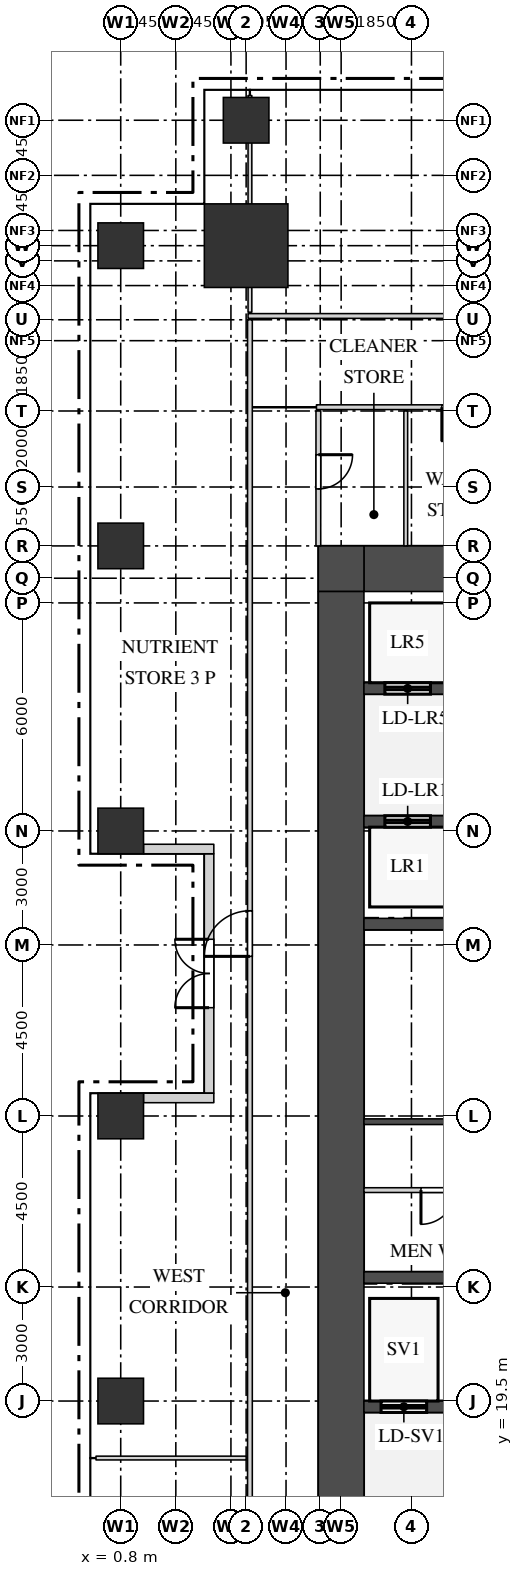
"""IFC4 building model, lengths in metres.
Left out: names, types, materials, properties, quantities, classifications, styles, units other than length and angle.
Written with IfcOpenShell. Run it as: python <this file> out.ifc"""

import sys

from ifc_helpers import new_model, si_unit, direction, frame, frame_2d, origin, origin_2d, place, context, subcontext, project, spatial, rectangle, extrude, source, transform, mapped, element, fill, save


model = new_model("IFC4")
c1 = context("Model", 3, precision=1e-05, world=origin(), true_north=direction((0.0, 1.0)))
c2 = subcontext(c1, "Body", "Model", "MODEL_VIEW")
j1 = project(units=[si_unit("LENGTHUNIT", "METRE"), si_unit("PLANEANGLEUNIT", "RADIAN")], contexts=[c1])
p1 = place(None, origin())
s1 = spatial("IfcSite", under=j1, at=p1, CompositionType="ELEMENT")
p2 = place(p1, origin())
s2 = spatial("IfcBuilding", under=s1, at=p2, CompositionType="ELEMENT")
p3 = place(p2, frame((0.0, 0.0, 60.0)))
s3 = spatial("IfcBuildingStorey", under=s2, at=p3, CompositionType="ELEMENT", Elevation=60.0)
m1 = source(origin(), c2, "Body", "SweptSolid", [
    extrude(rectangle(XDim=6.7, YDim=1.2, at=frame_2d((3.35, 0.0))), origin(), (0.0, 0.0, 1.0), 4.2),
])
p4 = place(p3, frame((7.2, 41.4, 0.0), z_axis=(0.0, 0.0, 1.0), x_axis=(1.0, 0.0, 0.0)))
e1 = element("IfcWall", 1, at=p4, inside=s3, PredefinedType="SHEAR", context=c2, shape_type="MappedRepresentation", body=[
    mapped(m1, transform((0.0, 0.0, 0.0))),
])
m2 = source(origin(), c2, "Body", "SweptSolid", [
    extrude(rectangle(XDim=1.2, YDim=1.2, at=frame_2d((0.6, 0.0))), origin(), (0.0, 0.0, 1.0), 4.2),
])
p5 = place(p3, frame((6.0, 41.4, 0.0), z_axis=(0.0, 0.0, 1.0), x_axis=(1.0, 0.0, 0.0)))
e2 = element("IfcWall", 2, at=p5, inside=s3, PredefinedType="SHEAR", context=c2, shape_type="MappedRepresentation", body=[
    mapped(m2, transform((0.0, 0.0, 0.0))),
])
m3 = source(origin(), c2, "Body", "SweptSolid", [
    extrude(rectangle(XDim=27.6, YDim=1.2, at=frame_2d((13.8, 0.0))), origin(), (0.0, 0.0, 1.0), 4.2),
])
p6 = place(p3, frame((6.6, 13.2, 0.0), z_axis=(0.0, 0.0, 1.0), x_axis=(0.0, 1.0, 0.0)))
e3 = element("IfcWall", 3, at=p6, inside=s3, PredefinedType="SHEAR", context=c2, shape_type="MappedRepresentation", body=[
    mapped(m3, transform((0.0, 0.0, 0.0))),
])
m4 = source(origin(), c2, "Body", "SweptSolid", [
    extrude(rectangle(XDim=13.0, YDim=0.3, at=frame_2d((6.5, 0.0))), origin(), (0.0, 0.0, 1.0), 4.2),
])
p7 = place(p3, frame((7.2, 22.75, 0.0), z_axis=(0.0, 0.0, 1.0), x_axis=(1.0, 0.0, 0.0)))
e4 = element("IfcWall", 4, at=p7, inside=s3, PredefinedType="STANDARD", context=c2, shape_type="MappedRepresentation", body=[
    mapped(m4, transform((0.0, 0.0, 0.0))),
])
m5 = source(origin(), c2, "Body", "SweptSolid", [
    extrude(rectangle(XDim=8.875, YDim=0.3, at=frame_2d((4.438, 0.0))), origin(), (0.0, 0.0, 1.0), 4.2),
])
p8 = place(p3, frame((7.2, 19.35, 0.0), z_axis=(0.0, 0.0, 1.0), x_axis=(1.0, 0.0, 0.0)))
e5 = element("IfcWall", 5, at=p8, inside=s3, PredefinedType="STANDARD", context=c2, shape_type="MappedRepresentation", body=[
    mapped(m5, transform((0.0, 0.0, 0.0))),
])
m6 = source(origin(), c2, "Body", "SweptSolid", [
    extrude(rectangle(XDim=1.2, YDim=2.1, at=frame_2d((0.6, 1.05))), frame((0.0, 0.16, 0.0), z_axis=(0.0, -1.0, 0.0), x_axis=(1.0, 0.0, 0.0)), (0.0, 0.0, 1.0), 0.32),
])
p9 = place(p8, frame((0.45, 0.0, 0.0)))
e6 = element("IfcOpeningElement", 6, at=p9, cuts=e5, PredefinedType="OPENING", context=c2, shape_type="MappedRepresentation", body=[
    mapped(m6, transform((0.0, 0.0, 0.0))),
])
p10 = place(p8, frame((2.8, 0.0, 0.0)))
e7 = element("IfcOpeningElement", 7, at=p10, cuts=e5, PredefinedType="OPENING", context=c2, shape_type="MappedRepresentation", body=[
    mapped(m6, transform((0.0, 0.0, 0.0))),
])
p11 = place(p8, frame((5.05, 0.0, 0.0)))
e8 = element("IfcOpeningElement", 8, at=p11, cuts=e5, PredefinedType="OPENING", context=c2, shape_type="MappedRepresentation", body=[
    mapped(m6, transform((0.0, 0.0, 0.0))),
])
p12 = place(p8, frame((7.2, 0.0, 0.0)))
e9 = element("IfcOpeningElement", 9, at=p12, cuts=e5, PredefinedType="OPENING", context=c2, shape_type="MappedRepresentation", body=[
    mapped(m6, transform((0.0, 0.0, 0.0))),
])
m7 = source(origin(), c2, "Body", "SweptSolid", [
    extrude(rectangle(XDim=15.6, YDim=0.3, at=frame_2d((7.8, 0.0))), origin(), (0.0, 0.0, 1.0), 4.2),
])
p13 = place(p3, frame((7.2, 32.05, 0.0), z_axis=(0.0, 0.0, 1.0), x_axis=(1.0, 0.0, 0.0)))
e10 = element("IfcWall", 10, at=p13, inside=s3, PredefinedType="STANDARD", context=c2, shape_type="MappedRepresentation", body=[
    mapped(m7, transform((0.0, 0.0, 0.0))),
])
p14 = place(p3, frame((7.2, 38.25, 0.0), z_axis=(0.0, 0.0, 1.0), x_axis=(1.0, 0.0, 0.0)))
e11 = element("IfcWall", 11, at=p14, inside=s3, PredefinedType="STANDARD", context=c2, shape_type="MappedRepresentation", body=[
    mapped(m7, transform((0.0, 0.0, 0.0))),
])
p15 = place(p14, frame((0.55, 0.0, 0.0)))
e12 = element("IfcOpeningElement", 12, at=p15, cuts=e11, PredefinedType="OPENING", context=c2, shape_type="MappedRepresentation", body=[
    mapped(m6, transform((0.0, 0.0, 0.0))),
])
p16 = place(p14, frame((3.1, 0.0, 0.0)))
e13 = element("IfcOpeningElement", 13, at=p16, cuts=e11, PredefinedType="OPENING", context=c2, shape_type="MappedRepresentation", body=[
    mapped(m6, transform((0.0, 0.0, 0.0))),
])
p17 = place(p14, frame((5.65, 0.0, 0.0)))
e14 = element("IfcOpeningElement", 14, at=p17, cuts=e11, PredefinedType="OPENING", context=c2, shape_type="MappedRepresentation", body=[
    mapped(m6, transform((0.0, 0.0, 0.0))),
])
p18 = place(p14, frame((8.2, 0.0, 0.0)))
e15 = element("IfcOpeningElement", 15, at=p18, cuts=e11, PredefinedType="OPENING", context=c2, shape_type="MappedRepresentation", body=[
    mapped(m6, transform((0.0, 0.0, 0.0))),
])
p19 = place(p3, frame((7.2, 34.75, 0.0), z_axis=(0.0, 0.0, 1.0), x_axis=(1.0, 0.0, 0.0)))
e16 = element("IfcWall", 16, at=p19, inside=s3, PredefinedType="STANDARD", context=c2, shape_type="MappedRepresentation", body=[
    mapped(m7, transform((0.0, 0.0, 0.0))),
])
p20 = place(p19, frame((0.55, 0.0, 0.0)))
e17 = element("IfcOpeningElement", 17, at=p20, cuts=e16, PredefinedType="OPENING", context=c2, shape_type="MappedRepresentation", body=[
    mapped(m6, transform((0.0, 0.0, 0.0))),
])
p21 = place(p19, frame((3.1, 0.0, 0.0)))
e18 = element("IfcOpeningElement", 18, at=p21, cuts=e16, PredefinedType="OPENING", context=c2, shape_type="MappedRepresentation", body=[
    mapped(m6, transform((0.0, 0.0, 0.0))),
])
p22 = place(p19, frame((5.65, 0.0, 0.0)))
e19 = element("IfcOpeningElement", 19, at=p22, cuts=e16, PredefinedType="OPENING", context=c2, shape_type="MappedRepresentation", body=[
    mapped(m6, transform((0.0, 0.0, 0.0))),
])
p23 = place(p19, frame((8.2, 0.0, 0.0)))
e20 = element("IfcOpeningElement", 20, at=p23, cuts=e16, PredefinedType="OPENING", context=c2, shape_type="MappedRepresentation", body=[
    mapped(m6, transform((0.0, 0.0, 0.0))),
])
m8 = source(origin(), c2, "Body", "SweptSolid", [
    extrude(rectangle(XDim=2.2, YDim=2.2, at=origin_2d()), origin(), (0.0, 0.0, 1.0), 4.5),
])
p24 = place(p3, frame((4.1, 49.9, 0.0), z_axis=(0.0, 0.0, 1.0), x_axis=(1.0, 0.0, 0.0)))
e21 = element("IfcColumn", 21, at=p24, inside=s3, PredefinedType="COLUMN", context=c2, shape_type="MappedRepresentation", body=[
    mapped(m8, transform((0.0, 0.0, 0.0))),
])
m9 = source(origin(), c2, "Body", "SweptSolid", [
    extrude(rectangle(XDim=1.2, YDim=1.2, at=origin_2d()), origin(), (0.0, 0.0, 1.0), 4.2),
])
for number, where, z_axis, x_axis in (
    (22, (4.1, 53.2, 0.0), (0.0, 0.0, 1.0), (1.0, 0.0, 0.0)),
    (23, (0.8, 19.5, 0.0), (0.0, 0.0, 1.0), (1.0, 0.0, 0.0)),
    (24, (0.8, 27.0, 0.0), (0.0, 0.0, 1.0), (1.0, 0.0, 0.0)),
    (25, (0.8, 34.5, 0.0), (0.0, 0.0, 1.0), (1.0, 0.0, 0.0)),
    (26, (0.8, 42.0, 0.0), (0.0, 0.0, 1.0), (1.0, 0.0, 0.0)),
    (27, (0.8, 49.9, 0.0), (0.0, 0.0, 1.0), (1.0, 0.0, 0.0)),
):
    element("IfcColumn", number, at=place(p3, frame(where, z_axis=z_axis, x_axis=x_axis)), inside=s3, PredefinedType="COLUMN", context=c2, shape_type="MappedRepresentation", body=[
        mapped(m9, transform((0.0, 0.0, 0.0))),
    ])
m10 = source(origin(), c2, "Body", "SweptSolid", [
    extrude(rectangle(XDim=6.3, YDim=0.25, at=frame_2d((3.15, 0.0))), origin(), (0.0, 0.0, 1.0), 4.2),
])
p25 = place(p3, frame((3.125, 27.6, 0.0), z_axis=(0.0, 0.0, 1.0), x_axis=(0.0, 1.0, 0.0)))
e28 = element("IfcWall", 28, at=p25, inside=s3, PredefinedType="SOLIDWALL", context=c2, shape_type="MappedRepresentation", body=[
    mapped(m10, transform((0.0, 0.0, 0.0))),
])
m11 = source(origin(), c2, "Body", "SweptSolid", [
    extrude(rectangle(XDim=1.6, YDim=2.4, at=frame_2d((0.8, 1.2))), frame((0.0, 0.135, 0.0), z_axis=(0.0, -1.0, 0.0), x_axis=(1.0, 0.0, 0.0)), (0.0, 0.0, 1.0), 0.27),
])
p26 = place(p25, frame((0.35, 0.0, 0.0)))
e29 = element("IfcOpeningElement", 29, at=p26, cuts=e28, PredefinedType="OPENING", context=c2, shape_type="MappedRepresentation", body=[
    mapped(m11, transform((0.0, 0.0, 0.0))),
])
p27 = place(p25, frame((4.35, 0.0, 0.0)))
e30 = element("IfcOpeningElement", 30, at=p27, cuts=e28, PredefinedType="OPENING", context=c2, shape_type="MappedRepresentation", body=[
    mapped(m11, transform((0.0, 0.0, 0.0))),
])
m12 = source(origin(), c2, "Body", "SweptSolid", [
    extrude(rectangle(XDim=1.8, YDim=2.4, at=frame_2d((0.9, 1.2))), frame((0.0, 0.135, 0.0), z_axis=(0.0, -1.0, 0.0), x_axis=(1.0, 0.0, 0.0)), (0.0, 0.0, 1.0), 0.27),
])
p28 = place(p25, frame((2.25, 0.0, 0.0)))
e31 = element("IfcOpeningElement", 31, at=p28, cuts=e28, PredefinedType="OPENING", context=c2, shape_type="MappedRepresentation", body=[
    mapped(m12, transform((0.0, 0.0, 0.0))),
])
m13 = source(origin(), c2, "Body", "SweptSolid", [
    extrude(rectangle(XDim=1.85, YDim=0.25, at=frame_2d((0.925, 0.0))), origin(), (0.0, 0.0, 1.0), 3.9),
])
for number, where, z_axis, x_axis in (
    (32, (1.4, 27.475, 0.0), (0.0, 0.0, 1.0), (1.0, 0.0, 0.0)),
    (33, (1.4, 34.025, 0.0), (0.0, 0.0, 1.0), (1.0, 0.0, 0.0)),
):
    element("IfcWall", number, at=place(p3, frame(where, z_axis=z_axis, x_axis=x_axis)), inside=s3, PredefinedType="SOLIDWALL", context=c2, shape_type="MappedRepresentation", body=[
        mapped(m13, transform((0.0, 0.0, 0.0))),
    ])
m14 = source(origin(), c2, "Body", "SweptSolid", [
    extrude(rectangle(XDim=41.8, YDim=0.125, at=frame_2d((20.9, 0.0))), origin(), (0.0, 0.0, 1.0), 4.3),
])
p29 = place(p3, frame((4.2, 6.15, 0.0), z_axis=(0.0, 0.0, 1.0), x_axis=(0.0, 1.0, 0.0)))
e34 = element("IfcWall", 34, at=p29, inside=s3, PredefinedType="PARTITIONING", context=c2, shape_type="MappedRepresentation", body=[
    mapped(m14, transform((0.0, 0.0, 0.0))),
])
m15 = source(origin(), c2, "Body", "SweptSolid", [
    extrude(rectangle(XDim=0.9, YDim=2.1, at=frame_2d((0.45, 1.05))), frame((0.0, 0.073, 0.0), z_axis=(0.0, -1.0, 0.0), x_axis=(1.0, 0.0, 0.0)), (0.0, 0.0, 1.0), 0.145),
])
p30 = place(p29, frame((6.45, 0.0, 0.0)))
e35 = element("IfcOpeningElement", 35, at=p30, cuts=e34, PredefinedType="OPENING", context=c2, shape_type="MappedRepresentation", body=[
    mapped(m15, transform((0.0, 0.0, 0.0))),
])
m16 = source(origin(), c2, "Body", "SweptSolid", [
    extrude(rectangle(XDim=1.2, YDim=2.1, at=frame_2d((0.6, 1.05))), frame((0.0, 0.073, 0.0), z_axis=(0.0, -1.0, 0.0), x_axis=(1.0, 0.0, 0.0)), (0.0, 0.0, 1.0), 0.145),
])
p31 = place(p29, frame((25.05, 0.0, 0.0)))
e36 = element("IfcOpeningElement", 36, at=p31, cuts=e34, PredefinedType="OPENING", context=c2, shape_type="MappedRepresentation", body=[
    mapped(m16, transform((0.0, 0.0, 0.0))),
])
m17 = source(origin(), c2, "Body", "SweptSolid", [
    extrude(rectangle(XDim=3.95, YDim=0.1, at=frame_2d((1.975, 0.0))), origin(), (0.0, 0.0, 1.0), 4.3),
])
p32 = place(p3, frame((0.15, 18.0, 0.0), z_axis=(0.0, 0.0, 1.0), x_axis=(1.0, 0.0, 0.0)))
e37 = element("IfcWall", 37, at=p32, inside=s3, PredefinedType="PARTITIONING", context=c2, shape_type="MappedRepresentation", body=[
    mapped(m17, transform((0.0, 0.0, 0.0))),
])
m18 = source(origin(), c2, "Body", "SweptSolid", [
    extrude(rectangle(XDim=15.6, YDim=0.125, at=frame_2d((7.8, 0.0))), origin(), (0.0, 0.0, 1.0), 4.3),
])
p33 = place(p3, frame((7.2, 25.05, 0.0), z_axis=(0.0, 0.0, 1.0), x_axis=(1.0, 0.0, 0.0)))
e38 = element("IfcWall", 38, at=p33, inside=s3, PredefinedType="PARTITIONING", context=c2, shape_type="MappedRepresentation", body=[
    mapped(m18, transform((0.0, 0.0, 0.0))),
])
p34 = place(p33, frame((1.5, 0.0, 0.0)))
e39 = element("IfcOpeningElement", 39, at=p34, cuts=e38, PredefinedType="OPENING", context=c2, shape_type="MappedRepresentation", body=[
    mapped(m15, transform((0.0, 0.0, 0.0))),
])
p35 = place(p33, frame((5.4, 0.0, 0.0)))
e40 = element("IfcOpeningElement", 40, at=p35, cuts=e38, PredefinedType="OPENING", context=c2, shape_type="MappedRepresentation", body=[
    mapped(m15, transform((0.0, 0.0, 0.0))),
])
m19 = source(origin(), c2, "Body", "SweptSolid", [
    extrude(rectangle(XDim=1.0, YDim=2.1, at=frame_2d((0.5, 1.05))), frame((0.0, 0.073, 0.0), z_axis=(0.0, -1.0, 0.0), x_axis=(1.0, 0.0, 0.0)), (0.0, 0.0, 1.0), 0.145),
])
p36 = place(p33, frame((8.9, 0.0, 0.0)))
e41 = element("IfcOpeningElement", 41, at=p36, cuts=e38, PredefinedType="OPENING", context=c2, shape_type="MappedRepresentation", body=[
    mapped(m19, transform((0.0, 0.0, 0.0))),
])
p37 = place(p33, frame((12.85, 0.0, 0.0)))
e42 = element("IfcOpeningElement", 42, at=p37, cuts=e38, PredefinedType="OPENING", context=c2, shape_type="MappedRepresentation", body=[
    mapped(m15, transform((0.0, 0.0, 0.0))),
])
m20 = source(origin(), c2, "Body", "SweptSolid", [
    extrude(rectangle(XDim=15.6, YDim=0.15, at=frame_2d((7.8, 0.0))), origin(), (0.0, 0.0, 1.0), 4.3),
])
p38 = place(p3, frame((7.2, 26.85, 0.0), z_axis=(0.0, 0.0, 1.0), x_axis=(1.0, 0.0, 0.0)))
e43 = element("IfcWall", 43, at=p38, inside=s3, PredefinedType="PARTITIONING", context=c2, shape_type="MappedRepresentation", body=[
    mapped(m20, transform((0.0, 0.0, 0.0))),
])
m21 = source(origin(), c2, "Body", "SweptSolid", [
    extrude(rectangle(XDim=0.9, YDim=2.1, at=frame_2d((0.45, 1.05))), frame((0.0, 0.085, 0.0), z_axis=(0.0, -1.0, 0.0), x_axis=(1.0, 0.0, 0.0)), (0.0, 0.0, 1.0), 0.17),
])
p39 = place(p38, frame((3.45, 0.0, 0.0)))
e44 = element("IfcOpeningElement", 44, at=p39, cuts=e43, PredefinedType="OPENING", context=c2, shape_type="MappedRepresentation", body=[
    mapped(m21, transform((0.0, 0.0, 0.0))),
])
p40 = place(p38, frame((11.25, 0.0, 0.0)))
e45 = element("IfcOpeningElement", 45, at=p40, cuts=e43, PredefinedType="OPENING", context=c2, shape_type="MappedRepresentation", body=[
    mapped(m21, transform((0.0, 0.0, 0.0))),
])
m22 = source(origin(), c2, "Body", "SweptSolid", [
    extrude(rectangle(XDim=3.55, YDim=0.125, at=frame_2d((1.775, 0.0))), origin(), (0.0, 0.0, 1.0), 4.3),
])
p41 = place(p3, frame((6.0, 42.0, 0.0), z_axis=(0.0, 0.0, 1.0), x_axis=(0.0, 1.0, 0.0)))
e46 = element("IfcWall", 46, at=p41, inside=s3, PredefinedType="PARTITIONING", context=c2, shape_type="MappedRepresentation", body=[
    mapped(m22, transform((0.0, 0.0, 0.0))),
])
p42 = place(p41, frame((1.5, 0.0, 0.0)))
e47 = element("IfcOpeningElement", 47, at=p42, cuts=e46, PredefinedType="OPENING", context=c2, shape_type="MappedRepresentation", body=[
    mapped(m15, transform((0.0, 0.0, 0.0))),
])
m23 = source(origin(), c2, "Body", "SweptSolid", [
    extrude(rectangle(XDim=3.55, YDim=0.1, at=frame_2d((1.775, 0.0))), origin(), (0.0, 0.0, 1.0), 4.3),
])
p43 = place(p3, frame((8.3, 42.0, 0.0), z_axis=(0.0, 0.0, 1.0), x_axis=(0.0, 1.0, 0.0)))
e48 = element("IfcWall", 48, at=p43, inside=s3, PredefinedType="PARTITIONING", context=c2, shape_type="MappedRepresentation", body=[
    mapped(m23, transform((0.0, 0.0, 0.0))),
])
m24 = source(origin(), c2, "Body", "SweptSolid", [
    extrude(rectangle(XDim=7.95, YDim=0.125, at=frame_2d((3.975, 0.0))), origin(), (0.0, 0.0, 1.0), 4.3),
])
p44 = place(p3, frame((5.95, 45.65, 0.0), z_axis=(0.0, 0.0, 1.0), x_axis=(1.0, 0.0, 0.0)))
e49 = element("IfcWall", 49, at=p44, inside=s3, PredefinedType="PARTITIONING", context=c2, shape_type="MappedRepresentation", body=[
    mapped(m24, transform((0.0, 0.0, 0.0))),
])
p45 = place(p44, frame((3.3, 0.0, 0.0)))
e50 = element("IfcOpeningElement", 50, at=p45, cuts=e49, PredefinedType="OPENING", context=c2, shape_type="MappedRepresentation", body=[
    mapped(m15, transform((0.0, 0.0, 0.0))),
])
p46 = place(p44, frame((6.1, 0.0, 0.0)))
e51 = element("IfcOpeningElement", 51, at=p46, cuts=e49, PredefinedType="OPENING", context=c2, shape_type="MappedRepresentation", body=[
    mapped(m15, transform((0.0, 0.0, 0.0))),
])
m25 = source(origin(), c2, "Body", "SweptSolid", [
    extrude(rectangle(XDim=26.6, YDim=0.125, at=frame_2d((13.3, 0.0))), origin(), (0.0, 0.0, 1.0), 4.3),
])
p47 = place(p3, frame((4.15, 48.05, 0.0), z_axis=(0.0, 0.0, 1.0), x_axis=(1.0, 0.0, 0.0)))
e52 = element("IfcWall", 52, at=p47, inside=s3, PredefinedType="PARTITIONING", context=c2, shape_type="MappedRepresentation", body=[
    mapped(m25, transform((0.0, 0.0, 0.0))),
])
p48 = place(p47, frame((7.25, 0.0, 0.0)))
e53 = element("IfcOpeningElement", 53, at=p48, cuts=e52, PredefinedType="OPENING", context=c2, shape_type="MappedRepresentation", body=[
    mapped(m15, transform((0.0, 0.0, 0.0))),
])
p49 = place(p47, frame((20.5, 0.0, 0.0)))
e54 = element("IfcOpeningElement", 54, at=p49, cuts=e52, PredefinedType="OPENING", context=c2, shape_type="MappedRepresentation", body=[
    mapped(m15, transform((0.0, 0.0, 0.0))),
])
m26 = source(origin(), c2, "Body", "SweptSolid", [
    extrude(rectangle(XDim=5.7, YDim=0.1, at=frame_2d((2.85, 0.0))), origin(), (0.0, 0.0, 1.0), 3.6),
])
p50 = place(p3, frame((4.2, 48.15, 0.0), z_axis=(0.0, 0.0, 1.0), x_axis=(0.0, 1.0, 0.0)))
e55 = element("IfcWall", 55, at=p50, inside=s3, PredefinedType="PARTITIONING", context=c2, shape_type="MappedRepresentation", body=[
    mapped(m26, transform((0.0, 0.0, 0.0))),
])
m27 = source(origin(), c2, "Body", "SweptSolid", [
    extrude(rectangle(XDim=1.6, YDim=2.4, at=frame_2d((0.8, 1.2))), frame((0.0, 0.03, 0.0), z_axis=(0.0, -1.0, 0.0), x_axis=(1.0, 0.0, 0.0)), (0.0, 0.0, 1.0), 0.06),
])
p51 = place(p26, origin())
e56 = element("IfcWindow", 56, at=p51, inside=s3, PartitioningType="SINGLE_PANEL", PredefinedType="WINDOW", context=c2, shape_type="MappedRepresentation", body=[
    mapped(m27, transform((0.0, 0.0, 0.0))),
])
fill(e29, e56)
p52 = place(p27, origin())
e57 = element("IfcWindow", 57, at=p52, inside=s3, PartitioningType="SINGLE_PANEL", PredefinedType="WINDOW", context=c2, shape_type="MappedRepresentation", body=[
    mapped(m27, transform((0.0, 0.0, 0.0))),
])
fill(e30, e57)
m28 = source(origin(), c2, "Body", "SweptSolid", [
    extrude(rectangle(XDim=1.8, YDim=2.4, at=frame_2d((0.9, 1.2))), frame((0.0, 0.025, 0.0), z_axis=(0.0, -1.0, 0.0), x_axis=(1.0, 0.0, 0.0)), (0.0, 0.0, 1.0), 0.05),
])
p53 = place(p28, origin())
e58 = element("IfcDoor", 58, at=p53, inside=s3, OperationType="DOUBLE_DOOR_DOUBLE_SWING", PredefinedType="DOOR", context=c2, shape_type="MappedRepresentation", body=[
    mapped(m28, transform((0.0, 0.0, 0.0))),
])
fill(e31, e58)
m29 = source(origin(), c2, "Body", "SweptSolid", [
    extrude(rectangle(XDim=0.9, YDim=2.1, at=frame_2d((0.45, 1.05))), frame((0.0, 0.025, 0.0), z_axis=(0.0, -1.0, 0.0), x_axis=(1.0, 0.0, 0.0)), (0.0, 0.0, 1.0), 0.05),
])
p54 = place(p34, origin())
e59 = element("IfcDoor", 59, at=p54, inside=s3, OperationType="SINGLE_SWING_LEFT", PredefinedType="DOOR", context=c2, shape_type="MappedRepresentation", body=[
    mapped(m29, transform((0.0, 0.0, 0.0))),
])
fill(e39, e59)
p55 = place(p42, origin())
e60 = element("IfcDoor", 60, at=p55, inside=s3, OperationType="SINGLE_SWING_RIGHT", PredefinedType="DOOR", context=c2, shape_type="MappedRepresentation", body=[
    mapped(m29, transform((0.0, 0.0, 0.0))),
])
fill(e47, e60)
p56 = place(p45, origin())
e61 = element("IfcDoor", 61, at=p56, inside=s3, OperationType="SINGLE_SWING_LEFT", PredefinedType="DOOR", context=c2, shape_type="MappedRepresentation", body=[
    mapped(m29, transform((0.0, 0.0, 0.0))),
])
fill(e50, e61)
m30 = source(origin(), c2, "Body", "SweptSolid", [
    extrude(rectangle(XDim=1.2, YDim=2.1, at=frame_2d((0.6, 1.05))), frame((0.0, 0.025, 0.0), z_axis=(0.0, -1.0, 0.0), x_axis=(1.0, 0.0, 0.0)), (0.0, 0.0, 1.0), 0.05),
])
p57 = place(p31, origin())
e62 = element("IfcDoor", 62, at=p57, inside=s3, OperationType="SINGLE_SWING_RIGHT", PredefinedType="DOOR", context=c2, shape_type="MappedRepresentation", body=[
    mapped(m30, transform((0.0, 0.0, 0.0))),
])
fill(e36, e62)
p58 = place(p20, origin())
e63 = element("IfcDoor", 63, at=p58, inside=s3, OperationType="DOUBLE_DOOR_SLIDING", PredefinedType="DOOR", context=c2, shape_type="MappedRepresentation", body=[
    mapped(m30, transform((0.0, 0.0, 0.0))),
])
fill(e17, e63)
p59 = place(p15, origin())
e64 = element("IfcDoor", 64, at=p59, inside=s3, OperationType="DOUBLE_DOOR_SLIDING", PredefinedType="DOOR", context=c2, shape_type="MappedRepresentation", body=[
    mapped(m30, transform((0.0, 0.0, 0.0))),
])
fill(e12, e64)
p60 = place(p9, origin())
e65 = element("IfcDoor", 65, at=p60, inside=s3, OperationType="DOUBLE_DOOR_SLIDING", PredefinedType="DOOR", context=c2, shape_type="MappedRepresentation", body=[
    mapped(m30, transform((0.0, 0.0, 0.0))),
])
fill(e6, e65)
save(model, sys.argv[1])
